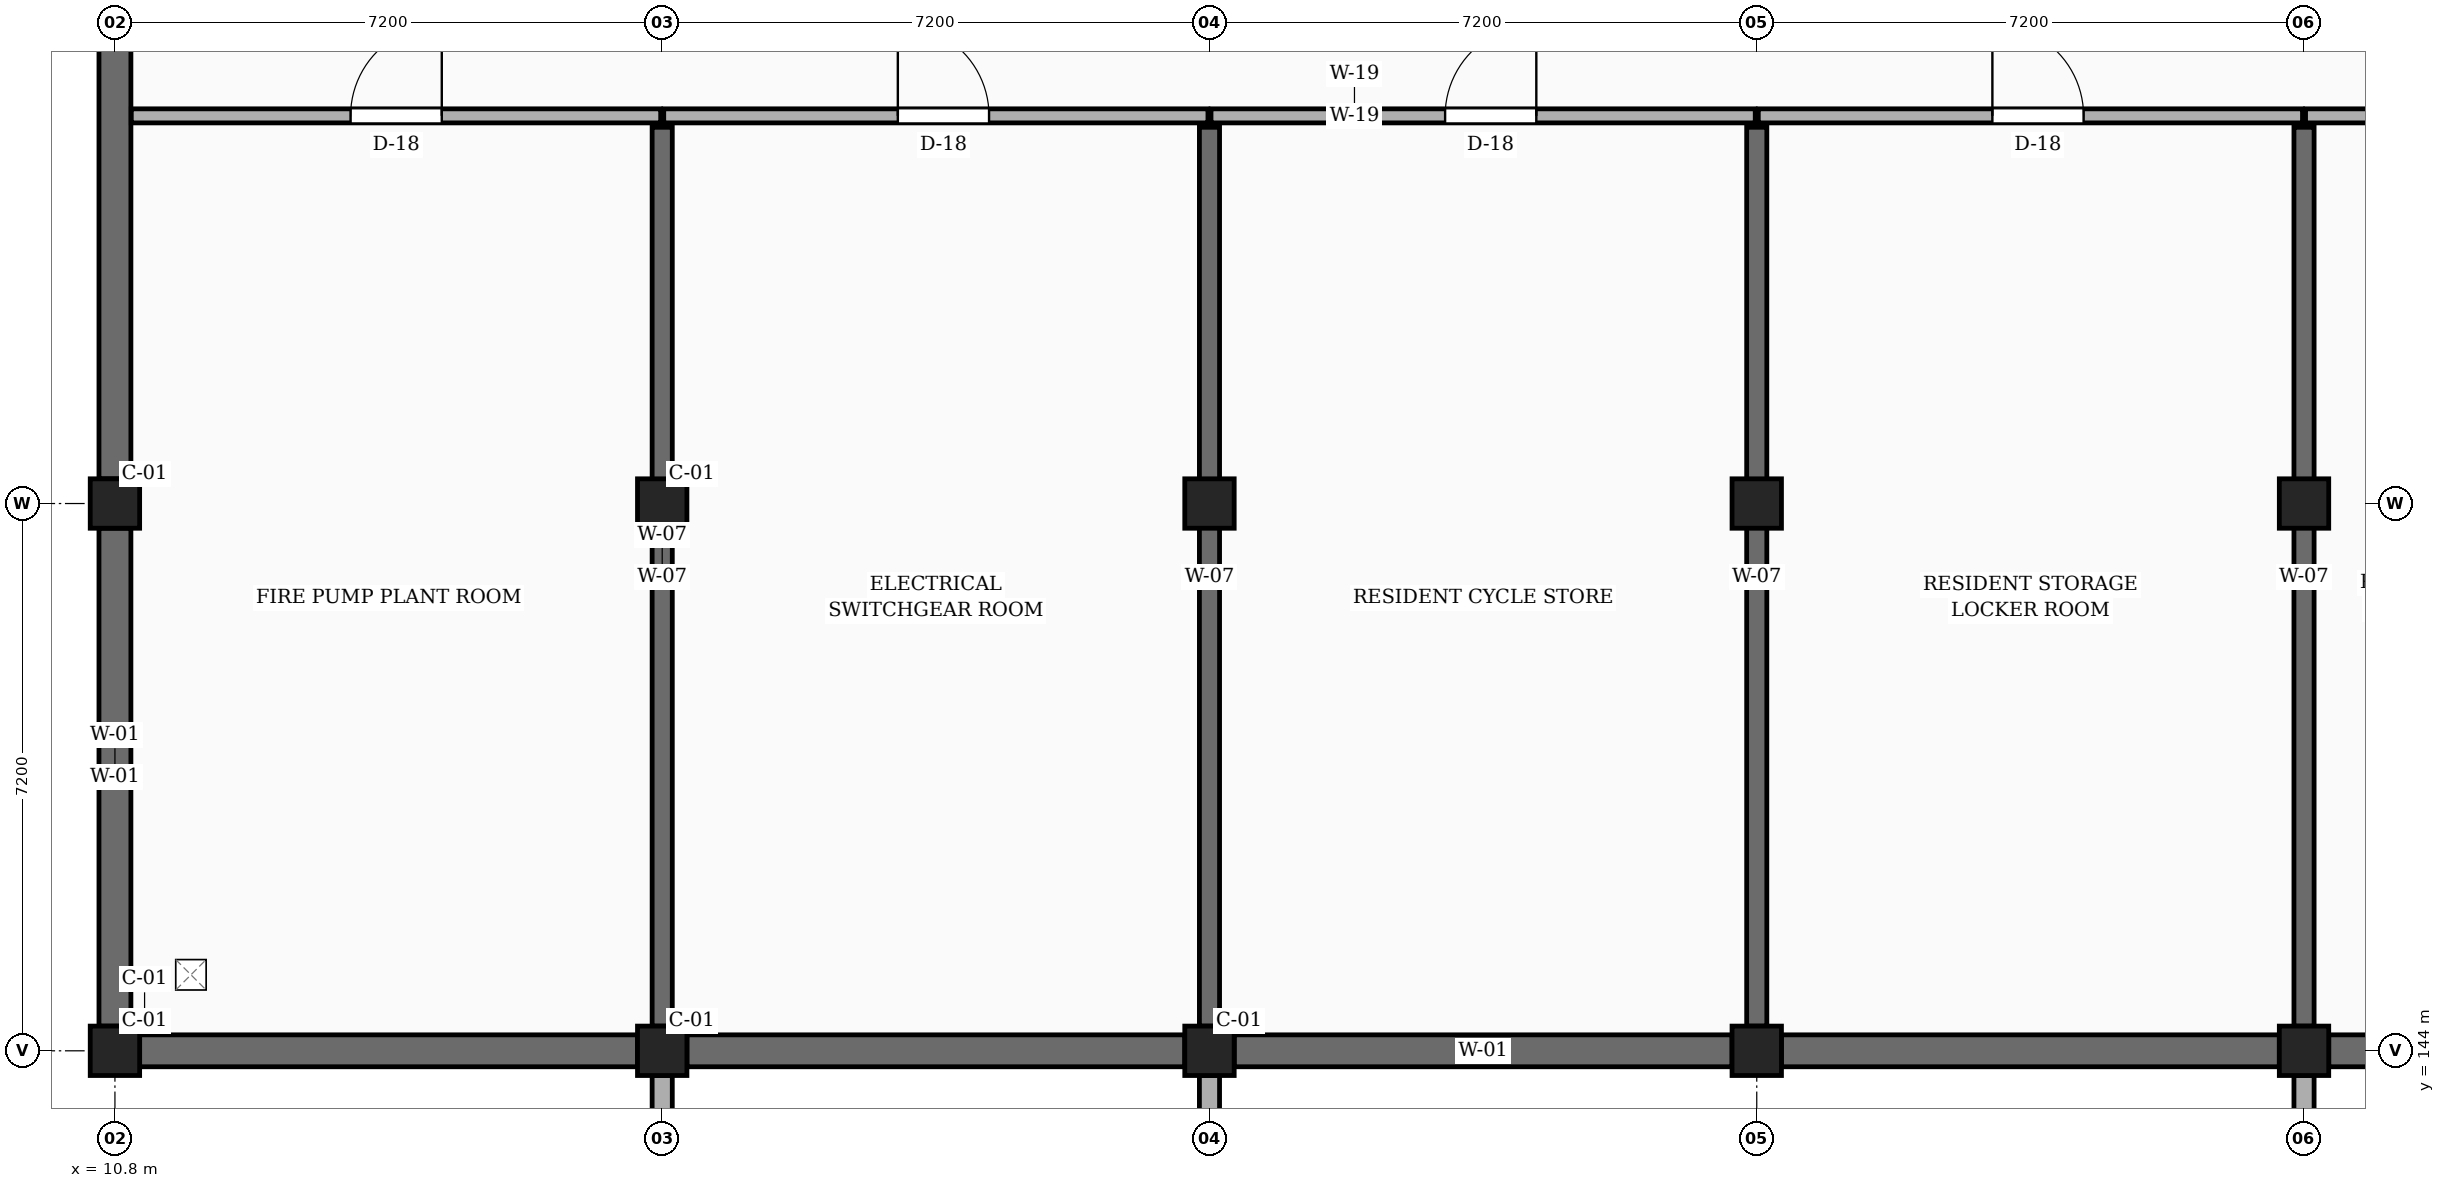
"""IFC4 building model, lengths in metres.
Left out: names, types, materials, properties, quantities, classifications, styles, units other than length and angle.
Written with IfcOpenShell. Run it as: python <this file> out.ifc"""

import sys

from ifc_helpers import new_model, si_unit, direction, frame, frame_2d, origin, origin_2d, place, context, subcontext, project, spatial, rectangle, extrude, element, fill, save


model = new_model("IFC4")
c1 = context("Model", 3, precision=1e-05, world=origin(), true_north=direction((0.0, 1.0)))
c2 = subcontext(c1, "Body", "Model", "MODEL_VIEW")
j1 = project(units=[si_unit("LENGTHUNIT", "METRE"), si_unit("PLANEANGLEUNIT", "RADIAN")], contexts=[c1])
p1 = place(None, origin())
s1 = spatial("IfcSite", under=j1, at=p1, CompositionType="ELEMENT")
p2 = place(p1, origin())
s2 = spatial("IfcBuilding", under=s1, at=p2, CompositionType="ELEMENT")
p3 = place(p2, frame((0.0, 0.0, -4.2)))
s3 = spatial("IfcBuildingStorey", under=s2, at=p3, CompositionType="ELEMENT", Elevation=-4.2)
for number, where, z_axis, x_axis in (
    (1, (25.2, 141.81, 0.0), (0.0, 0.0, 1.0), (0.0, 1.0, 0.0)),
    (2, (18.0, 143.675, 0.0), (0.0, 0.0, 1.0), (0.0, -1.0, 0.0)),
    (3, (39.6, 143.675, 0.0), (0.0, 0.0, 1.0), (0.0, -1.0, 0.0)),
):
    element("IfcWall", number, at=place(p3, frame(where, z_axis=z_axis, x_axis=x_axis)), inside=s3, PredefinedType="SOLIDWALL", context=c2, shape_type="SweptSolid", body=[
        extrude(rectangle(XDim=1.865, YDim=0.265, at=frame_2d((0.933, 0.0))), origin(), (0.0, 0.0, 1.0), 4.12),
    ])
for number, where, z_axis, x_axis in (
    (4, (10.8, 144.0, 0.0), (0.0, 0.0, 1.0), (1.0, 0.0, 0.0)),
    (5, (10.8, 151.2, 0.0), (0.0, 0.0, 1.0), (1.0, 0.0, 0.0)),
    (6, (18.0, 144.0, 0.0), (0.0, 0.0, 1.0), (1.0, 0.0, 0.0)),
    (7, (18.0, 151.2, 0.0), (0.0, 0.0, 1.0), (1.0, 0.0, 0.0)),
    (8, (25.2, 144.0, 0.0), (0.0, 0.0, 1.0), (1.0, 0.0, 0.0)),
    (9, (25.2, 151.2, 0.0), (0.0, 0.0, 1.0), (1.0, 0.0, 0.0)),
    (10, (32.4, 144.0, 0.0), (0.0, 0.0, 1.0), (1.0, 0.0, 0.0)),
    (11, (32.4, 151.2, 0.0), (0.0, 0.0, 1.0), (1.0, 0.0, 0.0)),
    (12, (39.6, 144.0, 0.0), (0.0, 0.0, 1.0), (1.0, 0.0, 0.0)),
    (13, (39.6, 151.2, 0.0), (0.0, 0.0, 1.0), (1.0, 0.0, 0.0)),
):
    element("IfcColumn", number, at=place(p3, frame(where, z_axis=z_axis, x_axis=x_axis)), inside=s3, PredefinedType="COLUMN", context=c2, shape_type="SweptSolid", body=[
        extrude(rectangle(XDim=0.65, YDim=0.65, at=origin_2d()), origin(), (0.0, 0.0, 1.0), 4.2),
    ])
for number, where, z_axis, x_axis in (
    (14, (11.125, 144.0, 0.0), (0.0, 0.0, 1.0), (1.0, 0.0, 0.0)),
    (15, (18.325, 144.0, 0.0), (0.0, 0.0, 1.0), (1.0, 0.0, 0.0)),
    (16, (25.525, 144.0, 0.0), (0.0, 0.0, 1.0), (1.0, 0.0, 0.0)),
):
    element("IfcWall", number, at=place(p3, frame(where, z_axis=z_axis, x_axis=x_axis)), inside=s3, PredefinedType="USERDEFINED", context=c2, shape_type="SweptSolid", body=[
        extrude(rectangle(XDim=6.55, YDim=0.42, at=frame_2d((3.275, 0.0))), origin(), (0.0, 0.0, 1.0), 3.03),
    ])
p4 = place(p3, frame((32.725, 144.0, 0.0), z_axis=(0.0, 0.0, 1.0), x_axis=(1.0, 0.0, 0.0)))
e17 = element("IfcWall", 17, at=p4, inside=s3, PredefinedType="USERDEFINED", context=c2, shape_type="SweptSolid", body=[
    extrude(rectangle(XDim=6.55, YDim=0.42, at=frame_2d((3.275, 0.0))), origin(), (0.0, 0.0, 1.0), 3.03),
])
for number, where, z_axis, x_axis in (
    (18, (39.925, 144.0, 0.0), (0.0, 0.0, 1.0), (1.0, 0.0, 0.0)),
    (19, (10.8, 150.875, 0.0), (0.0, 0.0, 1.0), (0.0, -1.0, 0.0)),
    (20, (10.8, 158.075, 0.0), (0.0, 0.0, 1.0), (0.0, -1.0, 0.0)),
):
    element("IfcWall", number, at=place(p3, frame(where, z_axis=z_axis, x_axis=x_axis)), inside=s3, PredefinedType="USERDEFINED", context=c2, shape_type="SweptSolid", body=[
        extrude(rectangle(XDim=6.55, YDim=0.42, at=frame_2d((3.275, 0.0))), origin(), (0.0, 0.0, 1.0), 3.03),
    ])
for number, where, z_axis, x_axis in (
    (21, (18.0, 144.325, 0.0), (0.0, 0.0, 1.0), (0.0, 1.0, 0.0)),
    (22, (25.2, 144.325, 0.0), (0.0, 0.0, 1.0), (0.0, 1.0, 0.0)),
    (23, (32.4, 144.325, 0.0), (0.0, 0.0, 1.0), (0.0, 1.0, 0.0)),
    (24, (39.6, 144.325, 0.0), (0.0, 0.0, 1.0), (0.0, 1.0, 0.0)),
):
    element("IfcWall", number, at=place(p3, frame(where, z_axis=z_axis, x_axis=x_axis)), inside=s3, PredefinedType="SOLIDWALL", context=c2, shape_type="SweptSolid", body=[
        extrude(rectangle(XDim=11.825, YDim=0.265, at=frame_2d((5.913, 0.0))), origin(), (0.0, 0.0, 1.0), 3.18),
    ])
p5 = place(p3, frame((11.015, 156.3, 0.0), z_axis=(0.0, 0.0, 1.0), x_axis=(1.0, 0.0, 0.0)))
e25 = element("IfcWall", 25, at=p5, inside=s3, PredefinedType="PARTITIONING", context=c2, shape_type="SweptSolid", body=[
    extrude(rectangle(XDim=6.965, YDim=0.185, at=frame_2d((3.482, 0.0))), origin(), (0.0, 0.0, 1.0), 3.315),
])
p6 = place(p5, frame((2.885, 0.0, 0.0)))
e26 = element("IfcOpeningElement", 26, at=p6, cuts=e25, PredefinedType="OPENING", context=c2, shape_type="SweptSolid", body=[
    extrude(rectangle(XDim=1.2, YDim=2.2, at=frame_2d((0.6, 1.1))), frame((0.0, 0.103, 0.0), z_axis=(0.0, -1.0, 0.0), x_axis=(1.0, 0.0, 0.0)), (0.0, 0.0, 1.0), 0.205),
])
p7 = place(p3, frame((18.02, 156.3, 0.0), z_axis=(0.0, 0.0, 1.0), x_axis=(1.0, 0.0, 0.0)))
e27 = element("IfcWall", 27, at=p7, inside=s3, PredefinedType="PARTITIONING", context=c2, shape_type="SweptSolid", body=[
    extrude(rectangle(XDim=7.16, YDim=0.185, at=frame_2d((3.58, 0.0))), origin(), (0.0, 0.0, 1.0), 3.315),
])
p8 = place(p7, frame((3.08, 0.0, 0.0)))
e28 = element("IfcOpeningElement", 28, at=p8, cuts=e27, PredefinedType="OPENING", context=c2, shape_type="SweptSolid", body=[
    extrude(rectangle(XDim=1.2, YDim=2.2, at=frame_2d((0.6, 1.1))), frame((0.0, 0.103, 0.0), z_axis=(0.0, -1.0, 0.0), x_axis=(1.0, 0.0, 0.0)), (0.0, 0.0, 1.0), 0.205),
])
p9 = place(p3, frame((25.22, 156.3, 0.0), z_axis=(0.0, 0.0, 1.0), x_axis=(1.0, 0.0, 0.0)))
e29 = element("IfcWall", 29, at=p9, inside=s3, PredefinedType="PARTITIONING", context=c2, shape_type="SweptSolid", body=[
    extrude(rectangle(XDim=7.16, YDim=0.185, at=frame_2d((3.58, 0.0))), origin(), (0.0, 0.0, 1.0), 3.315),
])
p10 = place(p9, frame((3.08, 0.0, 0.0)))
e30 = element("IfcOpeningElement", 30, at=p10, cuts=e29, PredefinedType="OPENING", context=c2, shape_type="SweptSolid", body=[
    extrude(rectangle(XDim=1.2, YDim=2.2, at=frame_2d((0.6, 1.1))), frame((0.0, 0.103, 0.0), z_axis=(0.0, -1.0, 0.0), x_axis=(1.0, 0.0, 0.0)), (0.0, 0.0, 1.0), 0.205),
])
p11 = place(p3, frame((32.42, 156.3, 0.0), z_axis=(0.0, 0.0, 1.0), x_axis=(1.0, 0.0, 0.0)))
e31 = element("IfcWall", 31, at=p11, inside=s3, PredefinedType="PARTITIONING", context=c2, shape_type="SweptSolid", body=[
    extrude(rectangle(XDim=7.16, YDim=0.185, at=frame_2d((3.58, 0.0))), origin(), (0.0, 0.0, 1.0), 3.315),
])
p12 = place(p11, frame((3.08, 0.0, 0.0)))
e32 = element("IfcOpeningElement", 32, at=p12, cuts=e31, PredefinedType="OPENING", context=c2, shape_type="SweptSolid", body=[
    extrude(rectangle(XDim=1.2, YDim=2.2, at=frame_2d((0.6, 1.1))), frame((0.0, 0.103, 0.0), z_axis=(0.0, -1.0, 0.0), x_axis=(1.0, 0.0, 0.0)), (0.0, 0.0, 1.0), 0.205),
])
p13 = place(p3, frame((39.62, 156.3, 0.0), z_axis=(0.0, 0.0, 1.0), x_axis=(1.0, 0.0, 0.0)))
e33 = element("IfcWall", 33, at=p13, inside=s3, PredefinedType="PARTITIONING", context=c2, shape_type="SweptSolid", body=[
    extrude(rectangle(XDim=7.16, YDim=0.185, at=frame_2d((3.58, 0.0))), origin(), (0.0, 0.0, 1.0), 3.315),
])
p14 = place(p13, frame((3.08, 0.0, 0.0)))
e34 = element("IfcOpeningElement", 34, at=p14, cuts=e33, PredefinedType="OPENING", context=c2, shape_type="SweptSolid", body=[
    extrude(rectangle(XDim=1.2, YDim=2.2, at=frame_2d((0.6, 1.1))), frame((0.0, 0.103, 0.0), z_axis=(0.0, -1.0, 0.0), x_axis=(1.0, 0.0, 0.0)), (0.0, 0.0, 1.0), 0.205),
])
p15 = place(p6, origin())
e35 = element("IfcDoor", 35, at=p15, inside=s3, OperationType="SINGLE_SWING_RIGHT", PredefinedType="DOOR", context=c2, shape_type="SweptSolid", body=[
    extrude(rectangle(XDim=1.2, YDim=2.2, at=frame_2d((0.6, 1.1))), frame((0.0, 0.025, 0.0), z_axis=(0.0, -1.0, 0.0), x_axis=(1.0, 0.0, 0.0)), (0.0, 0.0, 1.0), 0.05),
])
fill(e26, e35)
p16 = place(p8, origin())
e36 = element("IfcDoor", 36, at=p16, inside=s3, OperationType="SINGLE_SWING_LEFT", PredefinedType="DOOR", context=c2, shape_type="SweptSolid", body=[
    extrude(rectangle(XDim=1.2, YDim=2.2, at=frame_2d((0.6, 1.1))), frame((0.0, 0.025, 0.0), z_axis=(0.0, -1.0, 0.0), x_axis=(1.0, 0.0, 0.0)), (0.0, 0.0, 1.0), 0.05),
])
fill(e28, e36)
p17 = place(p10, origin())
e37 = element("IfcDoor", 37, at=p17, inside=s3, OperationType="SINGLE_SWING_RIGHT", PredefinedType="DOOR", context=c2, shape_type="SweptSolid", body=[
    extrude(rectangle(XDim=1.2, YDim=2.2, at=frame_2d((0.6, 1.1))), frame((0.0, 0.025, 0.0), z_axis=(0.0, -1.0, 0.0), x_axis=(1.0, 0.0, 0.0)), (0.0, 0.0, 1.0), 0.05),
])
fill(e30, e37)
p18 = place(p12, origin())
e38 = element("IfcDoor", 38, at=p18, inside=s3, OperationType="SINGLE_SWING_LEFT", PredefinedType="DOOR", context=c2, shape_type="SweptSolid", body=[
    extrude(rectangle(XDim=1.2, YDim=2.2, at=frame_2d((0.6, 1.1))), frame((0.0, 0.025, 0.0), z_axis=(0.0, -1.0, 0.0), x_axis=(1.0, 0.0, 0.0)), (0.0, 0.0, 1.0), 0.05),
])
fill(e32, e38)
save(model, sys.argv[1])
